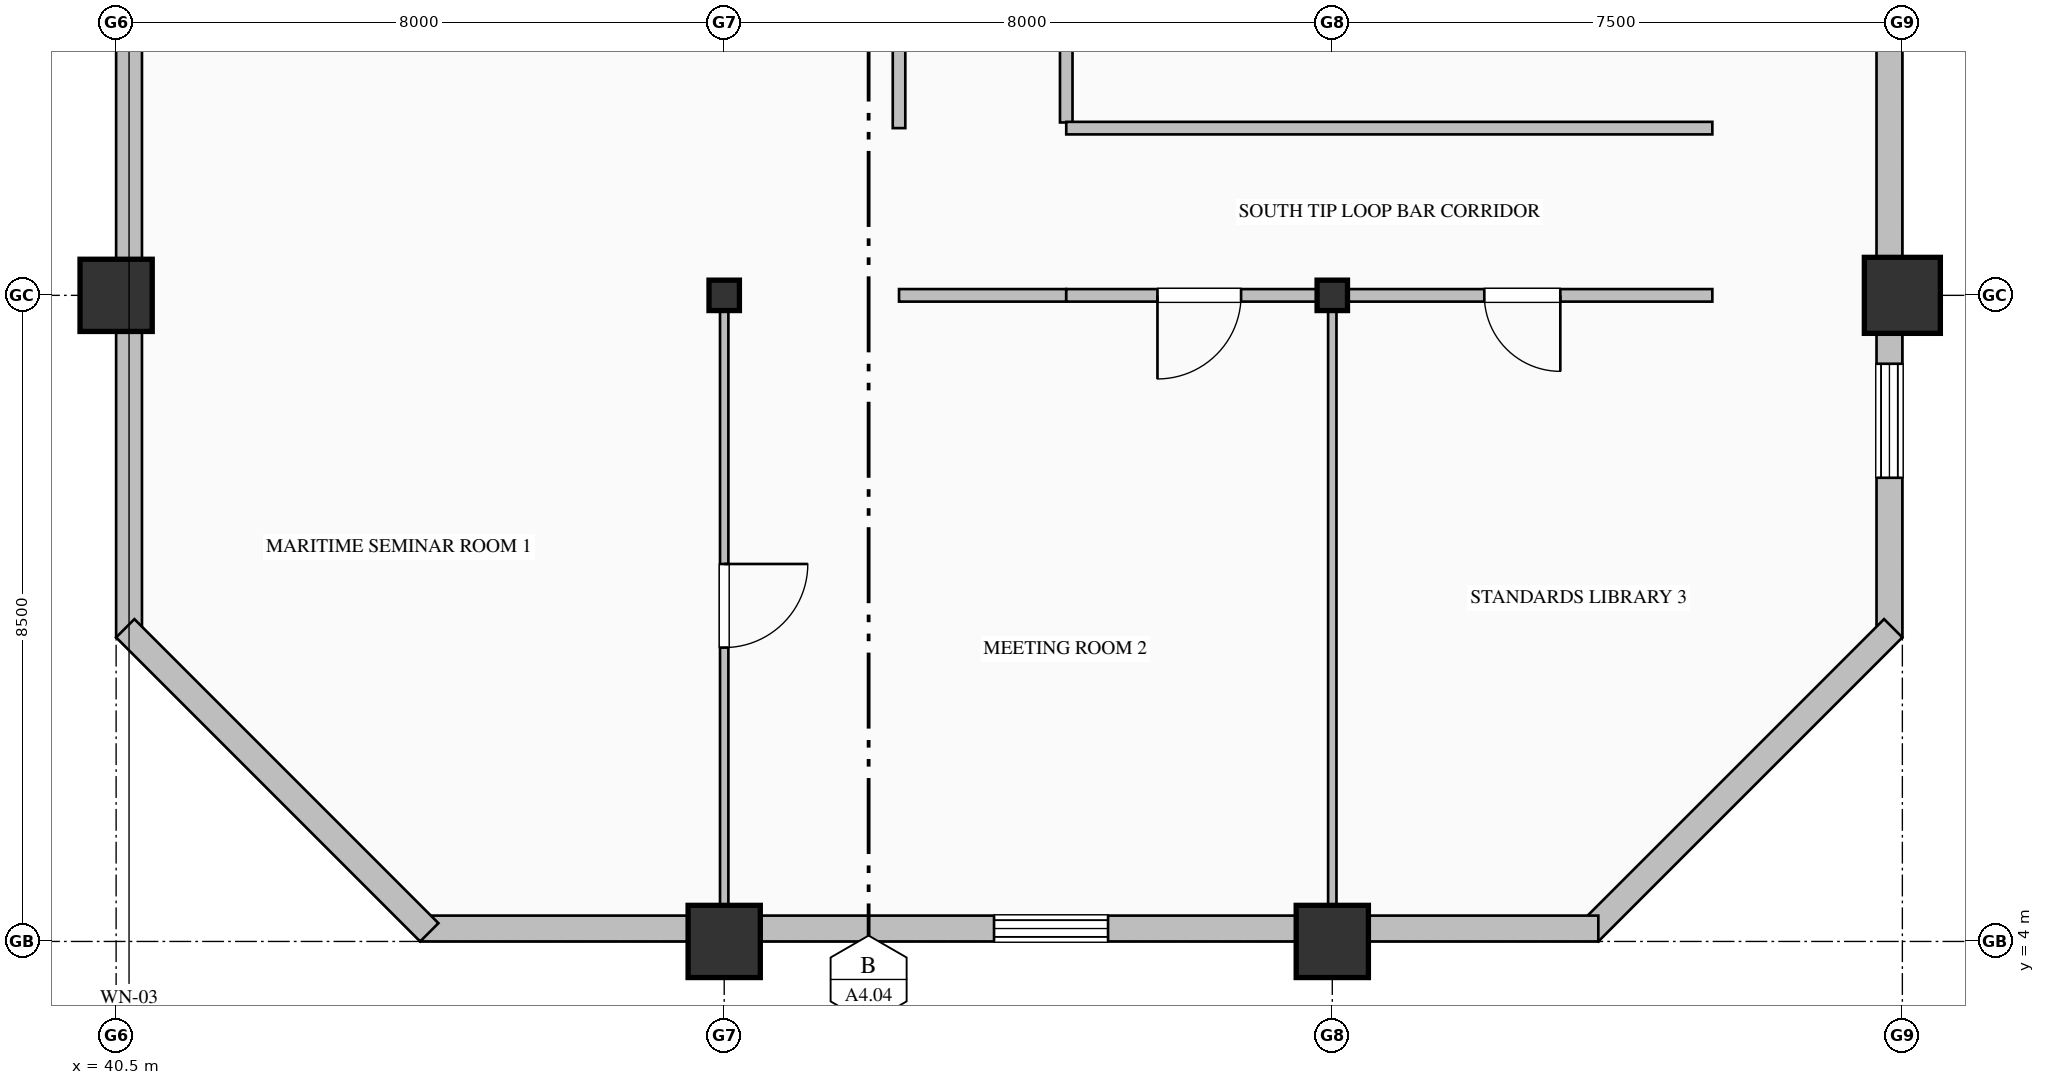
"""IFC4 building model, lengths in metres.
Left out: names, types, materials, properties, quantities, classifications, styles, units other than length and angle.
Written with IfcOpenShell. Run it as: python <this file> out.ifc"""

import sys

from ifc_helpers import new_model, si_unit, direction, frame, frame_2d, origin, origin_2d, place, context, subcontext, project, spatial, rectangle, hollow_rectangle, hollow_circle, i_section, extrude, element, fill, save


model = new_model("IFC4")
c1 = context("Model", 3, precision=1e-05, world=origin(), true_north=direction((0.0, 1.0)))
c2 = subcontext(c1, "Body", "Model", "MODEL_VIEW")
j1 = project(units=[si_unit("LENGTHUNIT", "METRE"), si_unit("PLANEANGLEUNIT", "RADIAN")], contexts=[c1])
p1 = place(None, origin())
s1 = spatial("IfcSite", under=j1, at=p1, CompositionType="ELEMENT")
p2 = place(p1, origin())
s2 = spatial("IfcBuilding", under=s1, at=p2, CompositionType="ELEMENT")
p3 = place(p2, frame((0.0, 0.0, 139.0)))
s3 = spatial("IfcBuildingStorey", under=s2, at=p3, CompositionType="ELEMENT", Elevation=139.0)
for number, where, z_axis, x_axis in (
    (1, (40.5, 12.5, 0.0), (0.0, 0.0, 1.0), (1.0, 0.0, 0.0)),
    (2, (48.5, 4.0, 0.0), (0.0, 0.0, 1.0), (1.0, 0.0, 0.0)),
):
    element("IfcColumn", number, at=place(p3, frame(where, z_axis=z_axis, x_axis=x_axis)), inside=s3, PredefinedType="COLUMN", context=c2, shape_type="SweptSolid", body=[
        extrude(hollow_rectangle(XDim=0.95, YDim=0.95, WallThickness=0.036, at=origin_2d()), origin(), (0.0, 0.0, 1.0), 4.0),
    ])
p4 = place(p3, frame((48.5, 12.5, 0.0), z_axis=(0.0, 0.0, 1.0), x_axis=(1.0, 0.0, 0.0)))
e3 = element("IfcColumn", 3, at=p4, inside=s3, PredefinedType="COLUMN", context=c2, shape_type="SweptSolid", body=[
    extrude(i_section(OverallWidth=0.4, OverallDepth=0.4, WebThickness=0.013, FlangeThickness=0.021, FilletRadius=0.022, at=origin_2d()), origin(), (0.0, 0.0, 1.0), 4.0),
])
p5 = place(p3, frame((56.5, 4.0, 0.0), z_axis=(0.0, 0.0, 1.0), x_axis=(1.0, 0.0, 0.0)))
e4 = element("IfcColumn", 4, at=p5, inside=s3, PredefinedType="COLUMN", context=c2, shape_type="SweptSolid", body=[
    extrude(hollow_rectangle(XDim=0.95, YDim=0.95, WallThickness=0.036, at=origin_2d()), origin(), (0.0, 0.0, 1.0), 4.0),
])
p6 = place(p3, frame((56.5, 12.5, 0.0), z_axis=(0.0, 0.0, 1.0), x_axis=(1.0, 0.0, 0.0)))
e5 = element("IfcColumn", 5, at=p6, inside=s3, PredefinedType="COLUMN", context=c2, shape_type="SweptSolid", body=[
    extrude(i_section(OverallWidth=0.4, OverallDepth=0.4, WebThickness=0.013, FlangeThickness=0.021, FilletRadius=0.022, at=origin_2d()), origin(), (0.0, 0.0, 1.0), 4.0),
])
p7 = place(p3, frame((64.0, 12.5, 0.0), z_axis=(0.0, 0.0, 1.0), x_axis=(1.0, 0.0, 0.0)))
e6 = element("IfcColumn", 6, at=p7, inside=s3, PredefinedType="COLUMN", context=c2, shape_type="SweptSolid", body=[
    extrude(hollow_circle(Radius=0.5, WallThickness=0.036, at=origin_2d()), origin(), (0.0, 0.0, 1.0), 4.0),
])
p8 = place(p3, frame((40.67, 8.0, 0.0), z_axis=(0.0, 0.0, 1.0), x_axis=(0.0, 1.0, 0.0)))
e7 = element("IfcWall", 7, at=p8, inside=s3, PredefinedType="SOLIDWALL", context=c2, shape_type="SweptSolid", body=[
    extrude(rectangle(XDim=20.34, YDim=0.34, at=frame_2d((10.17, 0.0))), origin(), (0.0, 0.0, 1.0), 3.165),
])
p9 = place(p8, frame((13.65, 0.0, 0.85)))
e8 = element("IfcOpeningElement", 8, at=p9, cuts=e7, PredefinedType="OPENING", context=c2, shape_type="SweptSolid", body=[
    extrude(rectangle(XDim=1.5, YDim=1.95, at=frame_2d((0.75, 0.975))), frame((0.0, 0.18, 0.0), z_axis=(0.0, -1.0, 0.0), x_axis=(1.0, 0.0, 0.0)), (0.0, 0.0, 1.0), 0.36),
])
p10 = place(p3, frame((63.83, 36.05, 0.0), z_axis=(0.0, 0.0, 1.0), x_axis=(0.0, -1.0, 0.0)))
e9 = element("IfcWall", 9, at=p10, inside=s3, PredefinedType="SOLIDWALL", context=c2, shape_type="SweptSolid", body=[
    extrude(rectangle(XDim=28.05, YDim=0.34, at=frame_2d((14.025, 0.0))), origin(), (0.0, 0.0, 1.0), 3.265),
])
p11 = place(p10, frame((2.85, 0.0, 0.85)))
e10 = element("IfcOpeningElement", 10, at=p11, cuts=e9, PredefinedType="OPENING", context=c2, shape_type="SweptSolid", body=[
    extrude(rectangle(XDim=1.5, YDim=1.95, at=frame_2d((0.75, 0.975))), frame((0.0, 0.18, 0.0), z_axis=(0.0, -1.0, 0.0), x_axis=(1.0, 0.0, 0.0)), (0.0, 0.0, 1.0), 0.36),
])
p12 = place(p10, frame((10.2, 0.0, 0.7)))
e11 = element("IfcOpeningElement", 11, at=p12, cuts=e9, PredefinedType="OPENING", context=c2, shape_type="SweptSolid", body=[
    extrude(rectangle(XDim=1.2, YDim=1.85, at=frame_2d((0.6, 0.925))), frame((0.0, 0.18, 0.0), z_axis=(0.0, -1.0, 0.0), x_axis=(1.0, 0.0, 0.0)), (0.0, 0.0, 1.0), 0.36),
])
p13 = place(p10, frame((13.65, 0.0, 0.85)))
e12 = element("IfcOpeningElement", 12, at=p13, cuts=e9, PredefinedType="OPENING", context=c2, shape_type="SweptSolid", body=[
    extrude(rectangle(XDim=1.5, YDim=1.95, at=frame_2d((0.75, 0.975))), frame((0.0, 0.18, 0.0), z_axis=(0.0, -1.0, 0.0), x_axis=(1.0, 0.0, 0.0)), (0.0, 0.0, 1.0), 0.36),
])
p14 = place(p10, frame((24.45, 0.0, 0.85)))
e13 = element("IfcOpeningElement", 13, at=p14, cuts=e9, PredefinedType="OPENING", context=c2, shape_type="SweptSolid", body=[
    extrude(rectangle(XDim=1.5, YDim=1.95, at=frame_2d((0.75, 0.975))), frame((0.0, 0.18, 0.0), z_axis=(0.0, -1.0, 0.0), x_axis=(1.0, 0.0, 0.0)), (0.0, 0.0, 1.0), 0.36),
])
p15 = place(p3, frame((63.88, 8.12, 0.0), z_axis=(0.0, 0.0, 1.0), x_axis=(-0.707106781187, -0.707106781187, 0.0)))
e14 = element("IfcWall", 14, at=p15, inside=s3, PredefinedType="SOLIDWALL", context=c2, shape_type="SweptSolid", body=[
    extrude(rectangle(XDim=5.657, YDim=0.34, at=frame_2d((2.828, 0.0))), origin(), (0.0, 0.0, 1.0), 3.765),
])
p16 = place(p3, frame((60.0, 4.17, 0.0), z_axis=(0.0, 0.0, 1.0), x_axis=(-1.0, 0.0, 0.0)))
e15 = element("IfcWall", 15, at=p16, inside=s3, PredefinedType="SOLIDWALL", context=c2, shape_type="SweptSolid", body=[
    extrude(rectangle(XDim=15.5, YDim=0.34, at=frame_2d((7.75, 0.0))), origin(), (0.0, 0.0, 1.0), 3.265),
])
p17 = place(p16, frame((6.45, 0.0, 0.85)))
e16 = element("IfcOpeningElement", 16, at=p17, cuts=e15, PredefinedType="OPENING", context=c2, shape_type="SweptSolid", body=[
    extrude(rectangle(XDim=1.5, YDim=1.95, at=frame_2d((0.75, 0.975))), frame((0.0, 0.18, 0.0), z_axis=(0.0, -1.0, 0.0), x_axis=(1.0, 0.0, 0.0)), (0.0, 0.0, 1.0), 0.36),
])
p18 = place(p3, frame((44.62, 4.12, 0.0), z_axis=(0.0, 0.0, 1.0), x_axis=(-0.707106781187, 0.707106781187, 0.0)))
e17 = element("IfcWall", 17, at=p18, inside=s3, PredefinedType="SOLIDWALL", context=c2, shape_type="SweptSolid", body=[
    extrude(rectangle(XDim=5.657, YDim=0.34, at=frame_2d((2.828, 0.0))), origin(), (0.0, 0.0, 1.0), 3.765),
])
p19 = place(p3, frame((53.0, 33.525, 0.0), z_axis=(0.0, 0.0, 1.0), x_axis=(0.0, -1.0, 0.0)))
e18 = element("IfcWall", 18, at=p19, inside=s3, PredefinedType="PARTITIONING", context=c2, shape_type="SweptSolid", body=[
    extrude(rectangle(XDim=18.751, YDim=0.165, at=frame_2d((9.375, 0.0))), origin(), (0.0, 0.0, 1.0), 3.765),
])
p20 = place(p19, frame((8.875, 0.0, 0.0)))
e19 = element("IfcOpeningElement", 19, at=p20, cuts=e18, PredefinedType="OPENING", context=c2, shape_type="SweptSolid", body=[
    extrude(rectangle(XDim=1.0, YDim=2.15, at=frame_2d((0.5, 1.075))), frame((0.0, 0.093, 0.0), z_axis=(0.0, -1.0, 0.0), x_axis=(1.0, 0.0, 0.0)), (0.0, 0.0, 1.0), 0.185),
])
p21 = place(p3, frame((50.8, 14.7, 0.0), z_axis=(0.0, 0.0, 1.0), x_axis=(0.0, 1.0, 0.0)))
e20 = element("IfcWall", 20, at=p21, inside=s3, PredefinedType="PARTITIONING", context=c2, shape_type="SweptSolid", body=[
    extrude(rectangle(XDim=18.825, YDim=0.165, at=frame_2d((9.413, 0.0))), origin(), (0.0, 0.0, 1.0), 3.765),
])
p22 = place(p21, frame((8.913, 0.0, 0.0)))
e21 = element("IfcOpeningElement", 21, at=p22, cuts=e20, PredefinedType="OPENING", context=c2, shape_type="SweptSolid", body=[
    extrude(rectangle(XDim=1.0, YDim=2.15, at=frame_2d((0.5, 1.075))), frame((0.0, 0.093, 0.0), z_axis=(0.0, -1.0, 0.0), x_axis=(1.0, 0.0, 0.0)), (0.0, 0.0, 1.0), 0.185),
])
p23 = place(p3, frame((53.0, 12.5, 0.0), z_axis=(0.0, 0.0, 1.0), x_axis=(-1.0, 0.0, 0.0)))
e22 = element("IfcWall", 22, at=p23, inside=s3, PredefinedType="PARTITIONING", context=c2, shape_type="SweptSolid", body=[
    extrude(rectangle(XDim=2.2, YDim=0.165, at=frame_2d((1.1, 0.0))), origin(), (0.0, 0.0, 1.0), 3.157),
])
p24 = place(p3, frame((53.0, 14.7, 0.0), z_axis=(0.0, 0.0, 1.0), x_axis=(1.0, 0.0, 0.0)))
e23 = element("IfcWall", 23, at=p24, inside=s3, PredefinedType="PARTITIONING", context=c2, shape_type="SweptSolid", body=[
    extrude(rectangle(XDim=8.5, YDim=0.165, at=frame_2d((4.25, 0.0))), origin(), (0.0, 0.0, 1.0), 3.765),
])
p25 = place(p3, frame((56.5, 12.5, 0.0), z_axis=(0.0, 0.0, 1.0), x_axis=(-1.0, 0.0, 0.0)))
e24 = element("IfcWall", 24, at=p25, inside=s3, PredefinedType="PARTITIONING", context=c2, shape_type="SweptSolid", body=[
    extrude(rectangle(XDim=3.5, YDim=0.165, at=frame_2d((1.75, 0.0))), origin(), (0.0, 0.0, 1.0), 3.157),
])
p26 = place(p25, frame((1.2, 0.0, 0.0)))
e25 = element("IfcOpeningElement", 25, at=p26, cuts=e24, PredefinedType="OPENING", context=c2, shape_type="SweptSolid", body=[
    extrude(rectangle(XDim=1.1, YDim=2.2, at=frame_2d((0.55, 1.1))), frame((0.0, 0.093, 0.0), z_axis=(0.0, -1.0, 0.0), x_axis=(1.0, 0.0, 0.0)), (0.0, 0.0, 1.0), 0.185),
])
p27 = place(p3, frame((61.5, 12.5, 0.0), z_axis=(0.0, 0.0, 1.0), x_axis=(-1.0, 0.0, 0.0)))
e26 = element("IfcWall", 26, at=p27, inside=s3, PredefinedType="PARTITIONING", context=c2, shape_type="SweptSolid", body=[
    extrude(rectangle(XDim=5.0, YDim=0.165, at=frame_2d((2.5, 0.0))), origin(), (0.0, 0.0, 1.0), 3.157),
])
p28 = place(p27, frame((2.0, 0.0, 0.0)))
e27 = element("IfcOpeningElement", 27, at=p28, cuts=e26, PredefinedType="OPENING", context=c2, shape_type="SweptSolid", body=[
    extrude(rectangle(XDim=1.0, YDim=2.15, at=frame_2d((0.5, 1.075))), frame((0.0, 0.093, 0.0), z_axis=(0.0, -1.0, 0.0), x_axis=(1.0, 0.0, 0.0)), (0.0, 0.0, 1.0), 0.185),
])
p29 = place(p3, frame((48.5, 12.5, 0.0), z_axis=(0.0, 0.0, 1.0), x_axis=(0.0, -1.0, 0.0)))
e28 = element("IfcWall", 28, at=p29, inside=s3, PredefinedType="MOVABLE", context=c2, shape_type="SweptSolid", body=[
    extrude(rectangle(XDim=8.168, YDim=0.11, at=frame_2d((4.084, 0.0))), origin(), (0.0, 0.0, 1.0), 3.157),
])
p30 = place(p29, frame((3.534, 0.0, 0.0)))
e29 = element("IfcOpeningElement", 29, at=p30, cuts=e28, PredefinedType="OPENING", context=c2, shape_type="SweptSolid", body=[
    extrude(rectangle(XDim=1.1, YDim=2.2, at=frame_2d((0.55, 1.1))), frame((0.0, 0.065, 0.0), z_axis=(0.0, -1.0, 0.0), x_axis=(1.0, 0.0, 0.0)), (0.0, 0.0, 1.0), 0.13),
])
p31 = place(p3, frame((56.5, 12.426, 0.0), z_axis=(0.0, 0.0, 1.0), x_axis=(0.0, -1.0, 0.0)))
e30 = element("IfcWall", 30, at=p31, inside=s3, PredefinedType="MOVABLE", context=c2, shape_type="SweptSolid", body=[
    extrude(rectangle(XDim=8.094, YDim=0.11, at=frame_2d((4.047, 0.0))), origin(), (0.0, 0.0, 1.0), 3.157),
])
p32 = place(p14, origin())
e31 = element("IfcWindow", 31, at=p32, inside=s3, PartitioningType="DOUBLE_PANEL_VERTICAL", PredefinedType="WINDOW", context=c2, shape_type="SweptSolid", body=[
    extrude(rectangle(XDim=1.5, YDim=1.95, at=frame_2d((0.75, 0.975))), frame((0.0, 0.15, 0.0), z_axis=(0.0, -1.0, 0.0), x_axis=(1.0, 0.0, 0.0)), (0.0, 0.0, 1.0), 0.06),
])
fill(e13, e31)
p33 = place(p17, origin())
e32 = element("IfcWindow", 32, at=p33, inside=s3, PartitioningType="DOUBLE_PANEL_VERTICAL", PredefinedType="WINDOW", context=c2, shape_type="SweptSolid", body=[
    extrude(rectangle(XDim=1.5, YDim=1.95, at=frame_2d((0.75, 0.975))), frame((0.0, 0.15, 0.0), z_axis=(0.0, -1.0, 0.0), x_axis=(1.0, 0.0, 0.0)), (0.0, 0.0, 1.0), 0.06),
])
fill(e16, e32)
p34 = place(p30, origin())
e33 = element("IfcDoor", 33, at=p34, inside=s3, OperationType="SINGLE_SWING_LEFT", PredefinedType="DOOR", context=c2, shape_type="SweptSolid", body=[
    extrude(rectangle(XDim=1.1, YDim=2.2, at=frame_2d((0.55, 1.1))), frame((0.0, 0.025, 0.0), z_axis=(0.0, -1.0, 0.0), x_axis=(1.0, 0.0, 0.0)), (0.0, 0.0, 1.0), 0.05),
])
fill(e29, e33)
p35 = place(p26, origin())
e34 = element("IfcDoor", 34, at=p35, inside=s3, OperationType="SINGLE_SWING_RIGHT", PredefinedType="DOOR", context=c2, shape_type="SweptSolid", body=[
    extrude(rectangle(XDim=1.1, YDim=2.2, at=frame_2d((0.55, 1.1))), frame((0.0, 0.025, 0.0), z_axis=(0.0, -1.0, 0.0), x_axis=(1.0, 0.0, 0.0)), (0.0, 0.0, 1.0), 0.05),
])
fill(e25, e34)
p36 = place(p28, origin())
e35 = element("IfcDoor", 35, at=p36, inside=s3, OperationType="SINGLE_SWING_LEFT", PredefinedType="DOOR", context=c2, shape_type="SweptSolid", body=[
    extrude(rectangle(XDim=1.0, YDim=2.15, at=frame_2d((0.5, 1.075))), frame((0.0, 0.025, 0.0), z_axis=(0.0, -1.0, 0.0), x_axis=(1.0, 0.0, 0.0)), (0.0, 0.0, 1.0), 0.05),
])
fill(e27, e35)
save(model, sys.argv[1])
